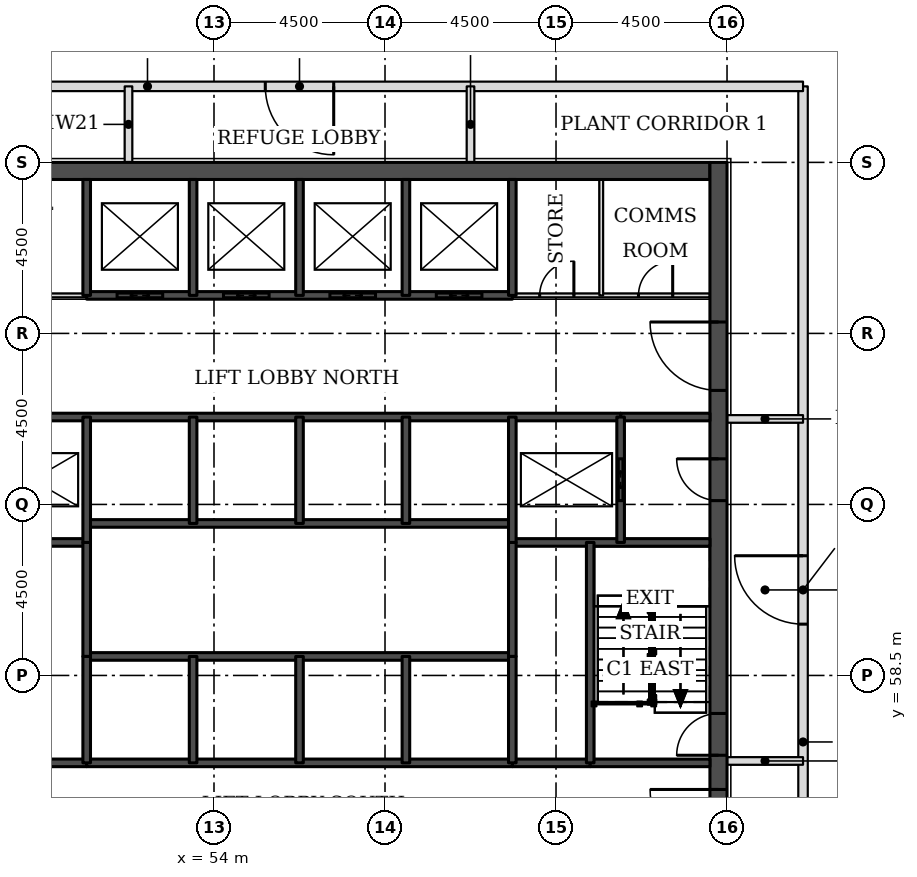
"""IFC4 building model, lengths in metres.
Left out: names, types, materials, properties, quantities, classifications, styles, units other than length and angle.
Written with IfcOpenShell. Run it as: python <this file> out.ifc"""

import sys

from ifc_helpers import new_model, si_unit, direction, frame, frame_2d, origin, place, context, subcontext, project, spatial, rectangle, extrude, element, fill, save


model = new_model("IFC4")
c1 = context("Model", 3, precision=1e-05, world=origin(), true_north=direction((0.0, 1.0)))
c2 = subcontext(c1, "Body", "Model", "MODEL_VIEW")
j1 = project(units=[si_unit("LENGTHUNIT", "METRE"), si_unit("PLANEANGLEUNIT", "RADIAN")], contexts=[c1])
p1 = place(None, origin())
s1 = spatial("IfcSite", under=j1, at=p1, CompositionType="ELEMENT")
p2 = place(p1, origin())
s2 = spatial("IfcBuilding", under=s1, at=p2, CompositionType="ELEMENT")
p3 = place(p2, frame((0.0, 0.0, 138.1)))
s3 = spatial("IfcBuildingStorey", under=s2, at=p3, CompositionType="ELEMENT", Elevation=138.1)
p4 = place(p3, frame((45.45, 71.775, 0.0), z_axis=(0.0, 0.0, 1.0), x_axis=(1.0, 0.0, 0.0)))
e1 = element("IfcWall", 1, at=p4, inside=s3, PredefinedType="SHEAR", context=c2, shape_type="SweptSolid", body=[
    extrude(rectangle(XDim=21.6, YDim=0.45, at=frame_2d((10.8, 0.0))), origin(), (0.0, 0.0, 1.0), 5.0),
])
p5 = place(p3, frame((67.275, 49.5, 0.0), z_axis=(0.0, 0.0, 1.0), x_axis=(0.0, 1.0, 0.0)))
e2 = element("IfcWall", 2, at=p5, inside=s3, PredefinedType="SHEAR", context=c2, shape_type="SweptSolid", body=[
    extrude(rectangle(XDim=22.5, YDim=0.45, at=frame_2d((11.25, 0.0))), origin(), (0.0, 0.0, 1.0), 5.0),
])
p6 = place(p5, frame((4.2, 0.0, 0.0)))
e3 = element("IfcOpeningElement", 3, at=p6, cuts=e2, PredefinedType="OPENING", context=c2, shape_type="SweptSolid", body=[
    extrude(rectangle(XDim=1.8, YDim=2.1, at=frame_2d((0.9, 1.05))), frame((0.0, 0.235, 0.0), z_axis=(0.0, -1.0, 0.0), x_axis=(1.0, 0.0, 0.0)), (0.0, 0.0, 1.0), 0.47),
])
p7 = place(p5, frame((6.9, 0.0, 0.0)))
e4 = element("IfcOpeningElement", 4, at=p7, cuts=e2, PredefinedType="OPENING", context=c2, shape_type="SweptSolid", body=[
    extrude(rectangle(XDim=1.1, YDim=2.1, at=frame_2d((0.55, 1.05))), frame((0.0, 0.235, 0.0), z_axis=(0.0, -1.0, 0.0), x_axis=(1.0, 0.0, 0.0)), (0.0, 0.0, 1.0), 0.47),
])
p8 = place(p5, frame((13.6, 0.0, 0.0)))
e5 = element("IfcOpeningElement", 5, at=p8, cuts=e2, PredefinedType="OPENING", context=c2, shape_type="SweptSolid", body=[
    extrude(rectangle(XDim=1.1, YDim=2.1, at=frame_2d((0.55, 1.05))), frame((0.0, 0.235, 0.0), z_axis=(0.0, -1.0, 0.0), x_axis=(1.0, 0.0, 0.0)), (0.0, 0.0, 1.0), 0.47),
])
p9 = place(p5, frame((16.5, 0.0, 0.0)))
e6 = element("IfcOpeningElement", 6, at=p9, cuts=e2, PredefinedType="OPENING", context=c2, shape_type="SweptSolid", body=[
    extrude(rectangle(XDim=1.8, YDim=2.1, at=frame_2d((0.9, 1.05))), frame((0.0, 0.235, 0.0), z_axis=(0.0, -1.0, 0.0), x_axis=(1.0, 0.0, 0.0)), (0.0, 0.0, 1.0), 0.47),
])
p10 = place(p3, frame((69.5, 47.5, 0.0), z_axis=(0.0, 0.0, 1.0), x_axis=(0.0, 1.0, 0.0)))
e7 = element("IfcWall", 7, at=p10, inside=s3, PredefinedType="PARTITIONING", context=c2, shape_type="SweptSolid", body=[
    extrude(rectangle(XDim=26.5, YDim=0.25, at=frame_2d((13.25, 0.0))), origin(), (0.0, 0.0, 1.0), 4.85),
])
p11 = place(p10, frame((12.35, 0.0, 0.0)))
e8 = element("IfcOpeningElement", 8, at=p11, cuts=e7, PredefinedType="OPENING", context=c2, shape_type="SweptSolid", body=[
    extrude(rectangle(XDim=1.8, YDim=2.1, at=frame_2d((0.9, 1.05))), frame((0.0, 0.135, 0.0), z_axis=(0.0, -1.0, 0.0), x_axis=(1.0, 0.0, 0.0)), (0.0, 0.0, 1.0), 0.27),
])
p12 = place(p3, frame((43.0, 74.0, 0.0), z_axis=(0.0, 0.0, 1.0), x_axis=(1.0, 0.0, 0.0)))
e9 = element("IfcWall", 9, at=p12, inside=s3, PredefinedType="PARTITIONING", context=c2, shape_type="SweptSolid", body=[
    extrude(rectangle(XDim=26.5, YDim=0.25, at=frame_2d((13.25, 0.0))), origin(), (0.0, 0.0, 1.0), 4.85),
])
p13 = place(p12, frame((12.35, 0.0, 0.0)))
e10 = element("IfcOpeningElement", 10, at=p13, cuts=e9, PredefinedType="OPENING", context=c2, shape_type="SweptSolid", body=[
    extrude(rectangle(XDim=1.8, YDim=2.1, at=frame_2d((0.9, 1.05))), frame((0.0, 0.135, 0.0), z_axis=(0.0, -1.0, 0.0), x_axis=(1.0, 0.0, 0.0)), (0.0, 0.0, 1.0), 0.27),
])
for number, where, z_axis, x_axis in (
    (11, (67.5, 56.25, 0.0), (0.0, 0.0, 1.0), (1.0, 0.0, 0.0)),
    (12, (67.5, 65.25, 0.0), (0.0, 0.0, 1.0), (1.0, 0.0, 0.0)),
    (13, (51.75, 72.0, 0.0), (0.0, 0.0, 1.0), (0.0, 1.0, 0.0)),
    (14, (60.75, 72.0, 0.0), (0.0, 0.0, 1.0), (0.0, 1.0, 0.0)),
):
    element("IfcWall", number, at=place(p3, frame(where, z_axis=z_axis, x_axis=x_axis)), inside=s3, PredefinedType="PARTITIONING", context=c2, shape_type="SweptSolid", body=[
        extrude(rectangle(XDim=2.0, YDim=0.2, at=frame_2d((1.0, 0.0))), origin(), (0.0, 0.0, 1.0), 4.85),
    ])
for number, where, z_axis, x_axis in (
    (15, (48.6, 56.2, 0.0), (0.0, 0.0, 1.0), (1.0, 0.0, 0.0)),
    (16, (61.85, 56.2, 0.0), (0.0, 0.0, 1.0), (1.0, 0.0, 0.0)),
):
    element("IfcWall", number, at=place(p3, frame(where, z_axis=z_axis, x_axis=x_axis)), inside=s3, PredefinedType="SOLIDWALL", context=c2, shape_type="SweptSolid", body=[
        extrude(rectangle(XDim=2.05, YDim=0.2, at=frame_2d((1.025, 0.0))), origin(), (0.0, 0.0, 1.0), 4.85),
    ])
p14 = place(p3, frame((50.65, 56.2, 0.0), z_axis=(0.0, 0.0, 1.0), x_axis=(1.0, 0.0, 0.0)))
e17 = element("IfcWall", 17, at=p14, inside=s3, PredefinedType="SOLIDWALL", context=c2, shape_type="SweptSolid", body=[
    extrude(rectangle(XDim=11.2, YDim=0.2, at=frame_2d((5.6, 0.0))), origin(), (0.0, 0.0, 1.0), 4.85),
])
p15 = place(p3, frame((63.9, 56.2, 0.0), z_axis=(0.0, 0.0, 1.0), x_axis=(1.0, 0.0, 0.0)))
e18 = element("IfcWall", 18, at=p15, inside=s3, PredefinedType="SOLIDWALL", context=c2, shape_type="SweptSolid", body=[
    extrude(rectangle(XDim=3.15, YDim=0.2, at=frame_2d((1.575, 0.0))), origin(), (0.0, 0.0, 1.0), 4.85),
])
p16 = place(p3, frame((50.65, 59.0, 0.0), z_axis=(0.0, 0.0, 1.0), x_axis=(1.0, 0.0, 0.0)))
e19 = element("IfcWall", 19, at=p16, inside=s3, PredefinedType="SOLIDWALL", context=c2, shape_type="SweptSolid", body=[
    extrude(rectangle(XDim=11.2, YDim=0.2, at=frame_2d((5.6, 0.0))), origin(), (0.0, 0.0, 1.0), 5.0),
])
for number, where, z_axis, x_axis in (
    (20, (45.45, 62.0, 0.0), (0.0, 0.0, 1.0), (1.0, 0.0, 0.0)),
    (21, (61.85, 62.0, 0.0), (0.0, 0.0, 1.0), (1.0, 0.0, 0.0)),
):
    element("IfcWall", number, at=place(p3, frame(where, z_axis=z_axis, x_axis=x_axis)), inside=s3, PredefinedType="SOLIDWALL", context=c2, shape_type="SweptSolid", body=[
        extrude(rectangle(XDim=5.2, YDim=0.2, at=frame_2d((2.6, 0.0))), origin(), (0.0, 0.0, 1.0), 4.85),
    ])
p17 = place(p3, frame((50.65, 62.5, 0.0), z_axis=(0.0, 0.0, 1.0), x_axis=(1.0, 0.0, 0.0)))
e22 = element("IfcWall", 22, at=p17, inside=s3, PredefinedType="SOLIDWALL", context=c2, shape_type="SweptSolid", body=[
    extrude(rectangle(XDim=11.2, YDim=0.2, at=frame_2d((5.6, 0.0))), origin(), (0.0, 0.0, 1.0), 5.0),
])
p18 = place(p3, frame((64.7, 65.3, 0.0), z_axis=(0.0, 0.0, 1.0), x_axis=(1.0, 0.0, 0.0)))
e23 = element("IfcWall", 23, at=p18, inside=s3, PredefinedType="SOLIDWALL", context=c2, shape_type="SweptSolid", body=[
    extrude(rectangle(XDim=2.35, YDim=0.2, at=frame_2d((1.175, 0.0))), origin(), (0.0, 0.0, 1.0), 4.85),
])
p19 = place(p3, frame((47.8, 65.3, 0.0), z_axis=(0.0, 0.0, 1.0), x_axis=(1.0, 0.0, 0.0)))
e24 = element("IfcWall", 24, at=p19, inside=s3, PredefinedType="SOLIDWALL", context=c2, shape_type="SweptSolid", body=[
    extrude(rectangle(XDim=16.9, YDim=0.2, at=frame_2d((8.45, 0.0))), origin(), (0.0, 0.0, 1.0), 4.85),
])
p20 = place(p3, frame((45.45, 68.5, 0.0), z_axis=(0.0, 0.0, 1.0), x_axis=(1.0, 0.0, 0.0)))
e25 = element("IfcWall", 25, at=p20, inside=s3, PredefinedType="PARTITIONING", context=c2, shape_type="SweptSolid", body=[
    extrude(rectangle(XDim=5.2, YDim=0.1, at=frame_2d((2.6, 0.0))), origin(), (0.0, 0.0, 1.0), 4.85),
])
p21 = place(p20, frame((2.15, 0.0, 0.0)))
e26 = element("IfcOpeningElement", 26, at=p21, cuts=e25, PredefinedType="OPENING", context=c2, shape_type="SweptSolid", body=[
    extrude(rectangle(XDim=0.9, YDim=2.1, at=frame_2d((0.45, 1.05))), frame((0.0, 0.06, 0.0), z_axis=(0.0, -1.0, 0.0), x_axis=(1.0, 0.0, 0.0)), (0.0, 0.0, 1.0), 0.12),
])
p22 = place(p3, frame((61.85, 68.5, 0.0), z_axis=(0.0, 0.0, 1.0), x_axis=(1.0, 0.0, 0.0)))
e27 = element("IfcWall", 27, at=p22, inside=s3, PredefinedType="PARTITIONING", context=c2, shape_type="SweptSolid", body=[
    extrude(rectangle(XDim=5.2, YDim=0.1, at=frame_2d((2.6, 0.0))), origin(), (0.0, 0.0, 1.0), 4.85),
])
p23 = place(p22, frame((3.32, 0.0, 0.0)))
e28 = element("IfcOpeningElement", 28, at=p23, cuts=e27, PredefinedType="OPENING", context=c2, shape_type="SweptSolid", body=[
    extrude(rectangle(XDim=0.9, YDim=2.1, at=frame_2d((0.45, 1.05))), frame((0.0, 0.06, 0.0), z_axis=(0.0, -1.0, 0.0), x_axis=(1.0, 0.0, 0.0)), (0.0, 0.0, 1.0), 0.12),
])
p24 = place(p22, frame((0.72, 0.0, 0.0)))
e29 = element("IfcOpeningElement", 29, at=p24, cuts=e27, PredefinedType="OPENING", context=c2, shape_type="SweptSolid", body=[
    extrude(rectangle(XDim=0.9, YDim=2.1, at=frame_2d((0.45, 1.05))), frame((0.0, 0.06, 0.0), z_axis=(0.0, -1.0, 0.0), x_axis=(1.0, 0.0, 0.0)), (0.0, 0.0, 1.0), 0.12),
])
p25 = place(p3, frame((50.65, 68.5, 0.0), z_axis=(0.0, 0.0, 1.0), x_axis=(1.0, 0.0, 0.0)))
e30 = element("IfcWall", 30, at=p25, inside=s3, PredefinedType="SOLIDWALL", context=c2, shape_type="SweptSolid", body=[
    extrude(rectangle(XDim=11.2, YDim=0.2, at=frame_2d((5.6, 0.0))), origin(), (0.0, 0.0, 1.0), 4.85),
])
p26 = place(p25, frame((0.8, 0.0, 0.0)))
e31 = element("IfcOpeningElement", 31, at=p26, cuts=e30, PredefinedType="OPENING", context=c2, shape_type="SweptSolid", body=[
    extrude(rectangle(XDim=1.2, YDim=2.1, at=frame_2d((0.6, 1.05))), frame((0.0, 0.11, 0.0), z_axis=(0.0, -1.0, 0.0), x_axis=(1.0, 0.0, 0.0)), (0.0, 0.0, 1.0), 0.22),
])
p27 = place(p25, frame((3.6, 0.0, 0.0)))
e32 = element("IfcOpeningElement", 32, at=p27, cuts=e30, PredefinedType="OPENING", context=c2, shape_type="SweptSolid", body=[
    extrude(rectangle(XDim=1.2, YDim=2.1, at=frame_2d((0.6, 1.05))), frame((0.0, 0.11, 0.0), z_axis=(0.0, -1.0, 0.0), x_axis=(1.0, 0.0, 0.0)), (0.0, 0.0, 1.0), 0.22),
])
p28 = place(p25, frame((6.4, 0.0, 0.0)))
e33 = element("IfcOpeningElement", 33, at=p28, cuts=e30, PredefinedType="OPENING", context=c2, shape_type="SweptSolid", body=[
    extrude(rectangle(XDim=1.2, YDim=2.1, at=frame_2d((0.6, 1.05))), frame((0.0, 0.11, 0.0), z_axis=(0.0, -1.0, 0.0), x_axis=(1.0, 0.0, 0.0)), (0.0, 0.0, 1.0), 0.22),
])
p29 = place(p25, frame((9.2, 0.0, 0.0)))
e34 = element("IfcOpeningElement", 34, at=p29, cuts=e30, PredefinedType="OPENING", context=c2, shape_type="SweptSolid", body=[
    extrude(rectangle(XDim=1.2, YDim=2.1, at=frame_2d((0.6, 1.05))), frame((0.0, 0.11, 0.0), z_axis=(0.0, -1.0, 0.0), x_axis=(1.0, 0.0, 0.0)), (0.0, 0.0, 1.0), 0.22),
])
p30 = place(p3, frame((50.65, 59.0, 0.0), z_axis=(0.0, 0.0, 1.0), x_axis=(0.0, 1.0, 0.0)))
e35 = element("IfcWall", 35, at=p30, inside=s3, PredefinedType="SOLIDWALL", context=c2, shape_type="SweptSolid", body=[
    extrude(rectangle(XDim=3.0, YDim=0.2, at=frame_2d((1.5, 0.0))), origin(), (0.0, 0.0, 1.0), 5.0),
])
p31 = place(p3, frame((50.65, 56.2, 0.0), z_axis=(0.0, 0.0, 1.0), x_axis=(0.0, 1.0, 0.0)))
e36 = element("IfcWall", 36, at=p31, inside=s3, PredefinedType="SOLIDWALL", context=c2, shape_type="SweptSolid", body=[
    extrude(rectangle(XDim=2.8, YDim=0.2, at=frame_2d((1.4, 0.0))), origin(), (0.0, 0.0, 1.0), 4.85),
])
p32 = place(p3, frame((50.65, 62.0, 0.0), z_axis=(0.0, 0.0, 1.0), x_axis=(0.0, 1.0, 0.0)))
e37 = element("IfcWall", 37, at=p32, inside=s3, PredefinedType="SOLIDWALL", context=c2, shape_type="SweptSolid", body=[
    extrude(rectangle(XDim=3.3, YDim=0.2, at=frame_2d((1.65, 0.0))), origin(), (0.0, 0.0, 1.0), 4.85),
])
p33 = place(p3, frame((50.65, 68.5, 0.0), z_axis=(0.0, 0.0, 1.0), x_axis=(0.0, 1.0, 0.0)))
e38 = element("IfcWall", 38, at=p33, inside=s3, PredefinedType="SOLIDWALL", context=c2, shape_type="SweptSolid", body=[
    extrude(rectangle(XDim=3.05, YDim=0.2, at=frame_2d((1.525, 0.0))), origin(), (0.0, 0.0, 1.0), 4.85),
])
for number, where, z_axis, x_axis in (
    (39, (53.45, 56.2, 0.0), (0.0, 0.0, 1.0), (0.0, 1.0, 0.0)),
    (40, (53.45, 62.5, 0.0), (0.0, 0.0, 1.0), (0.0, 1.0, 0.0)),
):
    element("IfcWall", number, at=place(p3, frame(where, z_axis=z_axis, x_axis=x_axis)), inside=s3, PredefinedType="SOLIDWALL", context=c2, shape_type="SweptSolid", body=[
        extrude(rectangle(XDim=2.8, YDim=0.2, at=frame_2d((1.4, 0.0))), origin(), (0.0, 0.0, 1.0), 4.85),
    ])
p34 = place(p3, frame((53.45, 68.5, 0.0), z_axis=(0.0, 0.0, 1.0), x_axis=(0.0, 1.0, 0.0)))
e41 = element("IfcWall", 41, at=p34, inside=s3, PredefinedType="SOLIDWALL", context=c2, shape_type="SweptSolid", body=[
    extrude(rectangle(XDim=3.05, YDim=0.2, at=frame_2d((1.525, 0.0))), origin(), (0.0, 0.0, 1.0), 4.85),
])
for number, where, z_axis, x_axis in (
    (42, (56.25, 56.2, 0.0), (0.0, 0.0, 1.0), (0.0, 1.0, 0.0)),
    (43, (56.25, 62.5, 0.0), (0.0, 0.0, 1.0), (0.0, 1.0, 0.0)),
):
    element("IfcWall", number, at=place(p3, frame(where, z_axis=z_axis, x_axis=x_axis)), inside=s3, PredefinedType="SOLIDWALL", context=c2, shape_type="SweptSolid", body=[
        extrude(rectangle(XDim=2.8, YDim=0.2, at=frame_2d((1.4, 0.0))), origin(), (0.0, 0.0, 1.0), 4.85),
    ])
p35 = place(p3, frame((56.25, 68.5, 0.0), z_axis=(0.0, 0.0, 1.0), x_axis=(0.0, 1.0, 0.0)))
e44 = element("IfcWall", 44, at=p35, inside=s3, PredefinedType="SOLIDWALL", context=c2, shape_type="SweptSolid", body=[
    extrude(rectangle(XDim=3.05, YDim=0.2, at=frame_2d((1.525, 0.0))), origin(), (0.0, 0.0, 1.0), 4.85),
])
for number, where, z_axis, x_axis in (
    (45, (59.05, 56.2, 0.0), (0.0, 0.0, 1.0), (0.0, 1.0, 0.0)),
    (46, (59.05, 62.5, 0.0), (0.0, 0.0, 1.0), (0.0, 1.0, 0.0)),
):
    element("IfcWall", number, at=place(p3, frame(where, z_axis=z_axis, x_axis=x_axis)), inside=s3, PredefinedType="SOLIDWALL", context=c2, shape_type="SweptSolid", body=[
        extrude(rectangle(XDim=2.8, YDim=0.2, at=frame_2d((1.4, 0.0))), origin(), (0.0, 0.0, 1.0), 4.85),
    ])
p36 = place(p3, frame((59.05, 68.5, 0.0), z_axis=(0.0, 0.0, 1.0), x_axis=(0.0, 1.0, 0.0)))
e47 = element("IfcWall", 47, at=p36, inside=s3, PredefinedType="SOLIDWALL", context=c2, shape_type="SweptSolid", body=[
    extrude(rectangle(XDim=3.05, YDim=0.2, at=frame_2d((1.525, 0.0))), origin(), (0.0, 0.0, 1.0), 4.85),
])
p37 = place(p3, frame((61.85, 59.0, 0.0), z_axis=(0.0, 0.0, 1.0), x_axis=(0.0, 1.0, 0.0)))
e48 = element("IfcWall", 48, at=p37, inside=s3, PredefinedType="SOLIDWALL", context=c2, shape_type="SweptSolid", body=[
    extrude(rectangle(XDim=3.0, YDim=0.2, at=frame_2d((1.5, 0.0))), origin(), (0.0, 0.0, 1.0), 5.0),
])
p38 = place(p3, frame((61.85, 56.2, 0.0), z_axis=(0.0, 0.0, 1.0), x_axis=(0.0, 1.0, 0.0)))
e49 = element("IfcWall", 49, at=p38, inside=s3, PredefinedType="SOLIDWALL", context=c2, shape_type="SweptSolid", body=[
    extrude(rectangle(XDim=2.8, YDim=0.2, at=frame_2d((1.4, 0.0))), origin(), (0.0, 0.0, 1.0), 4.85),
])
p39 = place(p3, frame((61.85, 62.0, 0.0), z_axis=(0.0, 0.0, 1.0), x_axis=(0.0, 1.0, 0.0)))
e50 = element("IfcWall", 50, at=p39, inside=s3, PredefinedType="SOLIDWALL", context=c2, shape_type="SweptSolid", body=[
    extrude(rectangle(XDim=3.3, YDim=0.2, at=frame_2d((1.65, 0.0))), origin(), (0.0, 0.0, 1.0), 4.85),
])
p40 = place(p3, frame((61.85, 68.5, 0.0), z_axis=(0.0, 0.0, 1.0), x_axis=(0.0, 1.0, 0.0)))
e51 = element("IfcWall", 51, at=p40, inside=s3, PredefinedType="SOLIDWALL", context=c2, shape_type="SweptSolid", body=[
    extrude(rectangle(XDim=3.05, YDim=0.2, at=frame_2d((1.525, 0.0))), origin(), (0.0, 0.0, 1.0), 4.85),
])
p41 = place(p3, frame((63.9, 56.2, 0.0), z_axis=(0.0, 0.0, 1.0), x_axis=(0.0, 1.0, 0.0)))
e52 = element("IfcWall", 52, at=p41, inside=s3, PredefinedType="SOLIDWALL", context=c2, shape_type="SweptSolid", body=[
    extrude(rectangle(XDim=5.8, YDim=0.2, at=frame_2d((2.9, 0.0))), origin(), (0.0, 0.0, 1.0), 4.85),
])
p42 = place(p3, frame((64.19, 68.5, 0.0), z_axis=(0.0, 0.0, 1.0), x_axis=(0.0, 1.0, 0.0)))
e53 = element("IfcWall", 53, at=p42, inside=s3, PredefinedType="PARTITIONING", context=c2, shape_type="SweptSolid", body=[
    extrude(rectangle(XDim=3.05, YDim=0.1, at=frame_2d((1.525, 0.0))), origin(), (0.0, 0.0, 1.0), 4.85),
])
p43 = place(p3, frame((64.7, 62.0, 0.0), z_axis=(0.0, 0.0, 1.0), x_axis=(0.0, 1.0, 0.0)))
e54 = element("IfcWall", 54, at=p43, inside=s3, PredefinedType="SOLIDWALL", context=c2, shape_type="SweptSolid", body=[
    extrude(rectangle(XDim=3.3, YDim=0.2, at=frame_2d((1.65, 0.0))), origin(), (0.0, 0.0, 1.0), 4.85),
])
p44 = place(p43, frame((1.1, 0.0, 0.0)))
e55 = element("IfcOpeningElement", 55, at=p44, cuts=e54, PredefinedType="OPENING", context=c2, shape_type="SweptSolid", body=[
    extrude(rectangle(XDim=1.1, YDim=2.1, at=frame_2d((0.55, 1.05))), frame((0.0, 0.11, 0.0), z_axis=(0.0, -1.0, 0.0), x_axis=(1.0, 0.0, 0.0)), (0.0, 0.0, 1.0), 0.22),
])
p45 = place(p13, frame((1.8, 0.0, 0.0), z_axis=(0.0, 0.0, 1.0), x_axis=(-1.0, 0.0, 0.0)))
e56 = element("IfcDoor", 56, at=p45, inside=s3, OperationType="SINGLE_SWING_LEFT", PredefinedType="DOOR", context=c2, shape_type="SweptSolid", body=[
    extrude(rectangle(XDim=1.8, YDim=2.1, at=frame_2d((0.9, 1.05))), frame((0.0, 0.025, 0.0), z_axis=(0.0, -1.0, 0.0), x_axis=(1.0, 0.0, 0.0)), (0.0, 0.0, 1.0), 0.05),
])
fill(e10, e56)
p46 = place(p11, origin())
e57 = element("IfcDoor", 57, at=p46, inside=s3, OperationType="SINGLE_SWING_RIGHT", PredefinedType="DOOR", context=c2, shape_type="SweptSolid", body=[
    extrude(rectangle(XDim=1.8, YDim=2.1, at=frame_2d((0.9, 1.05))), frame((0.0, 0.025, 0.0), z_axis=(0.0, -1.0, 0.0), x_axis=(1.0, 0.0, 0.0)), (0.0, 0.0, 1.0), 0.05),
])
fill(e8, e57)
p47 = place(p26, origin())
e58 = element("IfcDoor", 58, at=p47, inside=s3, OperationType="DOUBLE_DOOR_SLIDING", PredefinedType="DOOR", context=c2, shape_type="SweptSolid", body=[
    extrude(rectangle(XDim=1.2, YDim=2.1, at=frame_2d((0.6, 1.05))), frame((0.0, 0.025, 0.0), z_axis=(0.0, -1.0, 0.0), x_axis=(1.0, 0.0, 0.0)), (0.0, 0.0, 1.0), 0.05),
])
fill(e31, e58)
p48 = place(p27, origin())
e59 = element("IfcDoor", 59, at=p48, inside=s3, OperationType="DOUBLE_DOOR_SLIDING", PredefinedType="DOOR", context=c2, shape_type="SweptSolid", body=[
    extrude(rectangle(XDim=1.2, YDim=2.1, at=frame_2d((0.6, 1.05))), frame((0.0, 0.025, 0.0), z_axis=(0.0, -1.0, 0.0), x_axis=(1.0, 0.0, 0.0)), (0.0, 0.0, 1.0), 0.05),
])
fill(e32, e59)
p49 = place(p28, origin())
e60 = element("IfcDoor", 60, at=p49, inside=s3, OperationType="DOUBLE_DOOR_SLIDING", PredefinedType="DOOR", context=c2, shape_type="SweptSolid", body=[
    extrude(rectangle(XDim=1.2, YDim=2.1, at=frame_2d((0.6, 1.05))), frame((0.0, 0.025, 0.0), z_axis=(0.0, -1.0, 0.0), x_axis=(1.0, 0.0, 0.0)), (0.0, 0.0, 1.0), 0.05),
])
fill(e33, e60)
p50 = place(p29, origin())
e61 = element("IfcDoor", 61, at=p50, inside=s3, OperationType="DOUBLE_DOOR_SLIDING", PredefinedType="DOOR", context=c2, shape_type="SweptSolid", body=[
    extrude(rectangle(XDim=1.2, YDim=2.1, at=frame_2d((0.6, 1.05))), frame((0.0, 0.025, 0.0), z_axis=(0.0, -1.0, 0.0), x_axis=(1.0, 0.0, 0.0)), (0.0, 0.0, 1.0), 0.05),
])
fill(e34, e61)
p51 = place(p44, origin())
e62 = element("IfcDoor", 62, at=p51, inside=s3, OperationType="DOUBLE_DOOR_SLIDING", PredefinedType="DOOR", context=c2, shape_type="SweptSolid", body=[
    extrude(rectangle(XDim=1.1, YDim=2.1, at=frame_2d((0.55, 1.05))), frame((0.0, 0.025, 0.0), z_axis=(0.0, -1.0, 0.0), x_axis=(1.0, 0.0, 0.0)), (0.0, 0.0, 1.0), 0.05),
])
fill(e55, e62)
p52 = place(p6, origin())
e63 = element("IfcDoor", 63, at=p52, inside=s3, OperationType="SINGLE_SWING_RIGHT", PredefinedType="DOOR", context=c2, shape_type="SweptSolid", body=[
    extrude(rectangle(XDim=1.8, YDim=2.1, at=frame_2d((0.9, 1.05))), frame((0.0, 0.025, 0.0), z_axis=(0.0, -1.0, 0.0), x_axis=(1.0, 0.0, 0.0)), (0.0, 0.0, 1.0), 0.05),
])
fill(e3, e63)
p53 = place(p7, origin())
e64 = element("IfcDoor", 64, at=p53, inside=s3, OperationType="SINGLE_SWING_LEFT", PredefinedType="DOOR", context=c2, shape_type="SweptSolid", body=[
    extrude(rectangle(XDim=1.1, YDim=2.1, at=frame_2d((0.55, 1.05))), frame((0.0, 0.025, 0.0), z_axis=(0.0, -1.0, 0.0), x_axis=(1.0, 0.0, 0.0)), (0.0, 0.0, 1.0), 0.05),
])
fill(e4, e64)
p54 = place(p8, origin())
e65 = element("IfcDoor", 65, at=p54, inside=s3, OperationType="SINGLE_SWING_RIGHT", PredefinedType="DOOR", context=c2, shape_type="SweptSolid", body=[
    extrude(rectangle(XDim=1.1, YDim=2.1, at=frame_2d((0.55, 1.05))), frame((0.0, 0.025, 0.0), z_axis=(0.0, -1.0, 0.0), x_axis=(1.0, 0.0, 0.0)), (0.0, 0.0, 1.0), 0.05),
])
fill(e5, e65)
p55 = place(p9, origin())
e66 = element("IfcDoor", 66, at=p55, inside=s3, OperationType="SINGLE_SWING_RIGHT", PredefinedType="DOOR", context=c2, shape_type="SweptSolid", body=[
    extrude(rectangle(XDim=1.8, YDim=2.1, at=frame_2d((0.9, 1.05))), frame((0.0, 0.025, 0.0), z_axis=(0.0, -1.0, 0.0), x_axis=(1.0, 0.0, 0.0)), (0.0, 0.0, 1.0), 0.05),
])
fill(e6, e66)
p56 = place(p23, origin())
e67 = element("IfcDoor", 67, at=p56, inside=s3, OperationType="SINGLE_SWING_RIGHT", PredefinedType="DOOR", context=c2, shape_type="SweptSolid", body=[
    extrude(rectangle(XDim=0.9, YDim=2.1, at=frame_2d((0.45, 1.05))), frame((0.0, 0.025, 0.0), z_axis=(0.0, -1.0, 0.0), x_axis=(1.0, 0.0, 0.0)), (0.0, 0.0, 1.0), 0.05),
])
fill(e28, e67)
p57 = place(p24, origin())
e68 = element("IfcDoor", 68, at=p57, inside=s3, OperationType="SINGLE_SWING_RIGHT", PredefinedType="DOOR", context=c2, shape_type="SweptSolid", body=[
    extrude(rectangle(XDim=0.9, YDim=2.1, at=frame_2d((0.45, 1.05))), frame((0.0, 0.025, 0.0), z_axis=(0.0, -1.0, 0.0), x_axis=(1.0, 0.0, 0.0)), (0.0, 0.0, 1.0), 0.05),
])
fill(e29, e68)
save(model, sys.argv[1])
